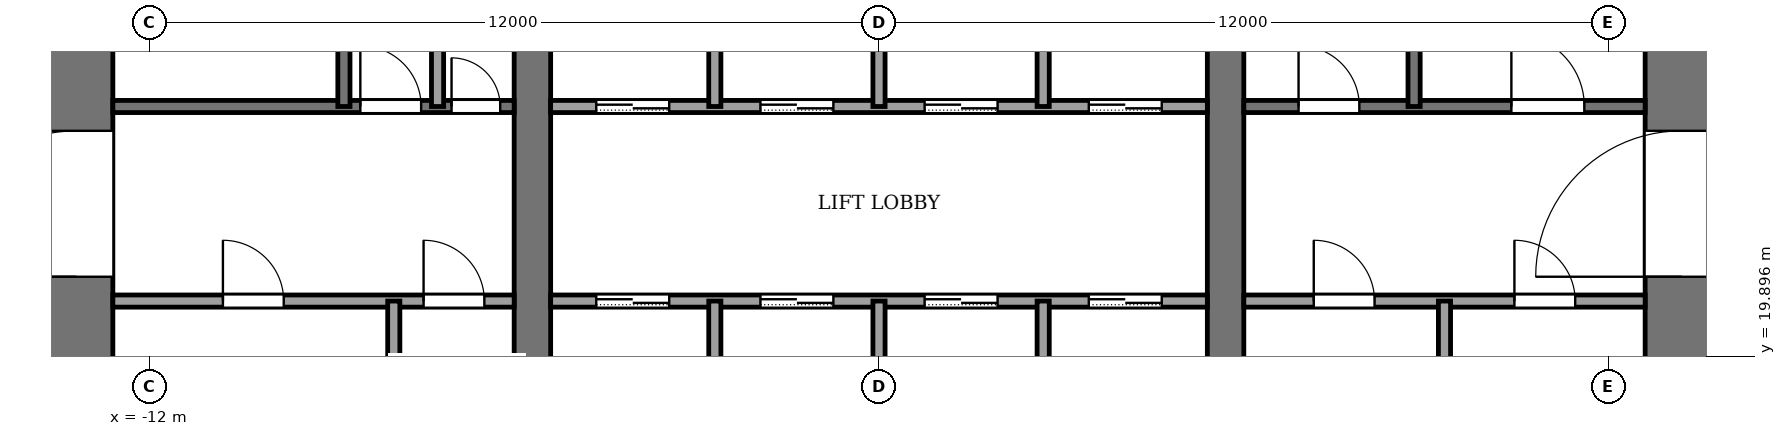
"""IFC4 building model, lengths in metres.
Left out: names, types, materials, properties, quantities, classifications, styles, units other than length and angle.
Written with IfcOpenShell. Run it as: python <this file> out.ifc"""

import sys

from ifc_helpers import new_model, si_unit, direction, frame, frame_2d, origin, place, context, subcontext, project, spatial, rectangle, extrude, element, fill, save


model = new_model("IFC4")
c1 = context("Model", 3, precision=1e-05, world=origin(), true_north=direction((0.0, 1.0)))
c2 = subcontext(c1, "Body", "Model", "MODEL_VIEW")
j1 = project(units=[si_unit("LENGTHUNIT", "METRE"), si_unit("PLANEANGLEUNIT", "RADIAN")], contexts=[c1])
p1 = place(None, origin())
s1 = spatial("IfcSite", under=j1, at=p1, CompositionType="ELEMENT")
p2 = place(p1, origin())
s2 = spatial("IfcBuilding", under=s1, at=p2, CompositionType="ELEMENT")
p3 = place(p2, frame((0.0, 0.0, 106.0)))
s3 = spatial("IfcBuildingStorey", under=s2, at=p3, CompositionType="ELEMENT", Elevation=106.0)
p4 = place(p3, frame((-13.2, 18.4, -0.13), z_axis=(0.0, 0.0, 1.0), x_axis=(0.0, 1.0, 0.0)))
e1 = element("IfcWall", 1, at=p4, inside=s3, PredefinedType="SHEAR", context=c2, shape_type="SweptSolid", body=[
    extrude(rectangle(XDim=19.2, YDim=1.2, at=frame_2d((9.6, 0.0))), origin(), (0.0, 0.0, 1.0), 4.0),
])
p5 = place(p4, frame((2.8, 0.0, 0.13)))
e2 = element("IfcOpeningElement", 2, at=p5, cuts=e1, PredefinedType="OPENING", context=c2, shape_type="SweptSolid", body=[
    extrude(rectangle(XDim=2.4, YDim=2.4, at=frame_2d((1.2, 1.2))), frame((0.0, 0.61, 0.0), z_axis=(0.0, -1.0, 0.0), x_axis=(1.0, 0.0, 0.0)), (0.0, 0.0, 1.0), 1.22),
])
p6 = place(p4, frame((13.4, 0.0, 0.13)))
e3 = element("IfcOpeningElement", 3, at=p6, cuts=e1, PredefinedType="OPENING", context=c2, shape_type="SweptSolid", body=[
    extrude(rectangle(XDim=1.4, YDim=2.2, at=frame_2d((0.7, 1.1))), frame((0.0, 0.61, 0.0), z_axis=(0.0, -1.0, 0.0), x_axis=(1.0, 0.0, 0.0)), (0.0, 0.0, 1.0), 1.22),
])
p7 = place(p3, frame((13.2, 18.4, -0.13), z_axis=(0.0, 0.0, 1.0), x_axis=(0.0, 1.0, 0.0)))
e4 = element("IfcWall", 4, at=p7, inside=s3, PredefinedType="SHEAR", context=c2, shape_type="SweptSolid", body=[
    extrude(rectangle(XDim=19.2, YDim=1.2, at=frame_2d((9.6, 0.0))), origin(), (0.0, 0.0, 1.0), 4.0),
])
p8 = place(p7, frame((2.8, 0.0, 0.13)))
e5 = element("IfcOpeningElement", 5, at=p8, cuts=e4, PredefinedType="OPENING", context=c2, shape_type="SweptSolid", body=[
    extrude(rectangle(XDim=2.4, YDim=2.4, at=frame_2d((1.2, 1.2))), frame((0.0, 0.61, 0.0), z_axis=(0.0, -1.0, 0.0), x_axis=(1.0, 0.0, 0.0)), (0.0, 0.0, 1.0), 1.22),
])
p9 = place(p7, frame((13.3, 0.0, 0.13)))
e6 = element("IfcOpeningElement", 6, at=p9, cuts=e4, PredefinedType="OPENING", context=c2, shape_type="SweptSolid", body=[
    extrude(rectangle(XDim=2.4, YDim=2.4, at=frame_2d((1.2, 1.2))), frame((0.0, 0.61, 0.0), z_axis=(0.0, -1.0, 0.0), x_axis=(1.0, 0.0, 0.0)), (0.0, 0.0, 1.0), 1.22),
])
p10 = place(p3, frame((-5.7, 18.4, -0.13), z_axis=(0.0, 0.0, 1.0), x_axis=(0.0, 1.0, 0.0)))
e7 = element("IfcWall", 7, at=p10, inside=s3, PredefinedType="SHEAR", context=c2, shape_type="SweptSolid", body=[
    extrude(rectangle(XDim=19.2, YDim=0.6, at=frame_2d((9.6, 0.0))), origin(), (0.0, 0.0, 1.0), 4.0),
])
p11 = place(p10, frame((8.35, 0.0, 0.13)))
e8 = element("IfcOpeningElement", 8, at=p11, cuts=e7, PredefinedType="OPENING", context=c2, shape_type="SweptSolid", body=[
    extrude(rectangle(XDim=0.9, YDim=2.1, at=frame_2d((0.45, 1.05))), frame((0.0, 0.31, 0.0), z_axis=(0.0, -1.0, 0.0), x_axis=(1.0, 0.0, 0.0)), (0.0, 0.0, 1.0), 0.62),
])
p12 = place(p3, frame((5.7, 18.4, -0.13), z_axis=(0.0, 0.0, 1.0), x_axis=(0.0, 1.0, 0.0)))
e9 = element("IfcWall", 9, at=p12, inside=s3, PredefinedType="SHEAR", context=c2, shape_type="SweptSolid", body=[
    extrude(rectangle(XDim=19.2, YDim=0.6, at=frame_2d((9.6, 0.0))), origin(), (0.0, 0.0, 1.0), 4.0),
])
p13 = place(p12, frame((8.35, 0.0, 0.13)))
e10 = element("IfcOpeningElement", 10, at=p13, cuts=e9, PredefinedType="OPENING", context=c2, shape_type="SweptSolid", body=[
    extrude(rectangle(XDim=0.9, YDim=2.1, at=frame_2d((0.45, 1.05))), frame((0.0, 0.31, 0.0), z_axis=(0.0, -1.0, 0.0), x_axis=(1.0, 0.0, 0.0)), (0.0, 0.0, 1.0), 0.62),
])
p14 = place(p12, frame((13.3, 0.0, 0.13)))
e11 = element("IfcOpeningElement", 11, at=p14, cuts=e9, PredefinedType="OPENING", context=c2, shape_type="SweptSolid", body=[
    extrude(rectangle(XDim=2.4, YDim=2.4, at=frame_2d((1.2, 1.2))), frame((0.0, 0.31, 0.0), z_axis=(0.0, -1.0, 0.0), x_axis=(1.0, 0.0, 0.0)), (0.0, 0.0, 1.0), 0.62),
])
p15 = place(p3, frame((-12.6, 20.8, 0.0), z_axis=(0.0, 0.0, 1.0), x_axis=(1.0, 0.0, 0.0)))
e12 = element("IfcWall", 12, at=p15, inside=s3, PredefinedType="PARTITIONING", context=c2, shape_type="SweptSolid", body=[
    extrude(rectangle(XDim=6.6, YDim=0.2, at=frame_2d((3.3, 0.0))), origin(), (0.0, 0.0, 1.0), 3.87),
])
p16 = place(p15, frame((1.81, 0.0, 0.0)))
e13 = element("IfcOpeningElement", 13, at=p16, cuts=e12, PredefinedType="OPENING", context=c2, shape_type="SweptSolid", body=[
    extrude(rectangle(XDim=1.0, YDim=2.1, at=frame_2d((0.5, 1.05))), frame((0.0, 0.11, 0.0), z_axis=(0.0, -1.0, 0.0), x_axis=(1.0, 0.0, 0.0)), (0.0, 0.0, 1.0), 0.22),
])
p17 = place(p15, frame((5.11, 0.0, 0.0)))
e14 = element("IfcOpeningElement", 14, at=p17, cuts=e12, PredefinedType="OPENING", context=c2, shape_type="SweptSolid", body=[
    extrude(rectangle(XDim=1.0, YDim=2.1, at=frame_2d((0.5, 1.05))), frame((0.0, 0.11, 0.0), z_axis=(0.0, -1.0, 0.0), x_axis=(1.0, 0.0, 0.0)), (0.0, 0.0, 1.0), 0.22),
])
p18 = place(p3, frame((-5.4, 20.8, 0.0), z_axis=(0.0, 0.0, 1.0), x_axis=(1.0, 0.0, 0.0)))
e15 = element("IfcWall", 15, at=p18, inside=s3, PredefinedType="PARTITIONING", context=c2, shape_type="SweptSolid", body=[
    extrude(rectangle(XDim=10.8, YDim=0.2, at=frame_2d((5.4, 0.0))), origin(), (0.0, 0.0, 1.0), 3.87),
])
p19 = place(p18, frame((0.75, 0.0, 0.0)))
e16 = element("IfcOpeningElement", 16, at=p19, cuts=e15, PredefinedType="OPENING", context=c2, shape_type="SweptSolid", body=[
    extrude(rectangle(XDim=1.2, YDim=2.2, at=frame_2d((0.6, 1.1))), frame((0.0, 0.11, 0.0), z_axis=(0.0, -1.0, 0.0), x_axis=(1.0, 0.0, 0.0)), (0.0, 0.0, 1.0), 0.22),
])
p20 = place(p18, frame((3.45, 0.0, 0.0)))
e17 = element("IfcOpeningElement", 17, at=p20, cuts=e15, PredefinedType="OPENING", context=c2, shape_type="SweptSolid", body=[
    extrude(rectangle(XDim=1.2, YDim=2.2, at=frame_2d((0.6, 1.1))), frame((0.0, 0.11, 0.0), z_axis=(0.0, -1.0, 0.0), x_axis=(1.0, 0.0, 0.0)), (0.0, 0.0, 1.0), 0.22),
])
p21 = place(p18, frame((6.15, 0.0, 0.0)))
e18 = element("IfcOpeningElement", 18, at=p21, cuts=e15, PredefinedType="OPENING", context=c2, shape_type="SweptSolid", body=[
    extrude(rectangle(XDim=1.2, YDim=2.2, at=frame_2d((0.6, 1.1))), frame((0.0, 0.11, 0.0), z_axis=(0.0, -1.0, 0.0), x_axis=(1.0, 0.0, 0.0)), (0.0, 0.0, 1.0), 0.22),
])
p22 = place(p18, frame((8.85, 0.0, 0.0)))
e19 = element("IfcOpeningElement", 19, at=p22, cuts=e15, PredefinedType="OPENING", context=c2, shape_type="SweptSolid", body=[
    extrude(rectangle(XDim=1.2, YDim=2.2, at=frame_2d((0.6, 1.1))), frame((0.0, 0.11, 0.0), z_axis=(0.0, -1.0, 0.0), x_axis=(1.0, 0.0, 0.0)), (0.0, 0.0, 1.0), 0.22),
])
p23 = place(p3, frame((6.0, 20.8, 0.0), z_axis=(0.0, 0.0, 1.0), x_axis=(1.0, 0.0, 0.0)))
e20 = element("IfcWall", 20, at=p23, inside=s3, PredefinedType="PARTITIONING", context=c2, shape_type="SweptSolid", body=[
    extrude(rectangle(XDim=6.6, YDim=0.2, at=frame_2d((3.3, 0.0))), origin(), (0.0, 0.0, 1.0), 3.87),
])
p24 = place(p23, frame((1.15, 0.0, 0.0)))
e21 = element("IfcOpeningElement", 21, at=p24, cuts=e20, PredefinedType="OPENING", context=c2, shape_type="SweptSolid", body=[
    extrude(rectangle(XDim=1.0, YDim=2.1, at=frame_2d((0.5, 1.05))), frame((0.0, 0.11, 0.0), z_axis=(0.0, -1.0, 0.0), x_axis=(1.0, 0.0, 0.0)), (0.0, 0.0, 1.0), 0.22),
])
p25 = place(p23, frame((4.45, 0.0, 0.0)))
e22 = element("IfcOpeningElement", 22, at=p25, cuts=e20, PredefinedType="OPENING", context=c2, shape_type="SweptSolid", body=[
    extrude(rectangle(XDim=1.0, YDim=2.1, at=frame_2d((0.5, 1.05))), frame((0.0, 0.11, 0.0), z_axis=(0.0, -1.0, 0.0), x_axis=(1.0, 0.0, 0.0)), (0.0, 0.0, 1.0), 0.22),
])
p26 = place(p3, frame((-12.6, 24.0, 0.0), z_axis=(0.0, 0.0, 1.0), x_axis=(1.0, 0.0, 0.0)))
e23 = element("IfcWall", 23, at=p26, inside=s3, PredefinedType="PARTITIONING", context=c2, shape_type="SweptSolid", body=[
    extrude(rectangle(XDim=6.6, YDim=0.2, at=frame_2d((3.3, 0.0))), origin(), (0.0, 0.0, 1.0), 3.87),
])
p27 = place(p26, frame((4.07, 0.0, 0.0)))
e24 = element("IfcOpeningElement", 24, at=p27, cuts=e23, PredefinedType="OPENING", context=c2, shape_type="SweptSolid", body=[
    extrude(rectangle(XDim=1.0, YDim=2.1, at=frame_2d((0.5, 1.05))), frame((0.0, 0.11, 0.0), z_axis=(0.0, -1.0, 0.0), x_axis=(1.0, 0.0, 0.0)), (0.0, 0.0, 1.0), 0.22),
])
p28 = place(p26, frame((5.57, 0.0, 0.0)))
e25 = element("IfcOpeningElement", 25, at=p28, cuts=e23, PredefinedType="OPENING", context=c2, shape_type="SweptSolid", body=[
    extrude(rectangle(XDim=0.8, YDim=2.1, at=frame_2d((0.4, 1.05))), frame((0.0, 0.11, 0.0), z_axis=(0.0, -1.0, 0.0), x_axis=(1.0, 0.0, 0.0)), (0.0, 0.0, 1.0), 0.22),
])
p29 = place(p3, frame((-5.4, 24.0, 0.0), z_axis=(0.0, 0.0, 1.0), x_axis=(1.0, 0.0, 0.0)))
e26 = element("IfcWall", 26, at=p29, inside=s3, PredefinedType="PARTITIONING", context=c2, shape_type="SweptSolid", body=[
    extrude(rectangle(XDim=10.8, YDim=0.2, at=frame_2d((5.4, 0.0))), origin(), (0.0, 0.0, 1.0), 3.87),
])
p30 = place(p29, frame((0.75, 0.0, 0.0)))
e27 = element("IfcOpeningElement", 27, at=p30, cuts=e26, PredefinedType="OPENING", context=c2, shape_type="SweptSolid", body=[
    extrude(rectangle(XDim=1.2, YDim=2.2, at=frame_2d((0.6, 1.1))), frame((0.0, 0.11, 0.0), z_axis=(0.0, -1.0, 0.0), x_axis=(1.0, 0.0, 0.0)), (0.0, 0.0, 1.0), 0.22),
])
p31 = place(p29, frame((3.45, 0.0, 0.0)))
e28 = element("IfcOpeningElement", 28, at=p31, cuts=e26, PredefinedType="OPENING", context=c2, shape_type="SweptSolid", body=[
    extrude(rectangle(XDim=1.2, YDim=2.2, at=frame_2d((0.6, 1.1))), frame((0.0, 0.11, 0.0), z_axis=(0.0, -1.0, 0.0), x_axis=(1.0, 0.0, 0.0)), (0.0, 0.0, 1.0), 0.22),
])
p32 = place(p29, frame((6.15, 0.0, 0.0)))
e29 = element("IfcOpeningElement", 29, at=p32, cuts=e26, PredefinedType="OPENING", context=c2, shape_type="SweptSolid", body=[
    extrude(rectangle(XDim=1.2, YDim=2.2, at=frame_2d((0.6, 1.1))), frame((0.0, 0.11, 0.0), z_axis=(0.0, -1.0, 0.0), x_axis=(1.0, 0.0, 0.0)), (0.0, 0.0, 1.0), 0.22),
])
p33 = place(p29, frame((8.85, 0.0, 0.0)))
e30 = element("IfcOpeningElement", 30, at=p33, cuts=e26, PredefinedType="OPENING", context=c2, shape_type="SweptSolid", body=[
    extrude(rectangle(XDim=1.2, YDim=2.2, at=frame_2d((0.6, 1.1))), frame((0.0, 0.11, 0.0), z_axis=(0.0, -1.0, 0.0), x_axis=(1.0, 0.0, 0.0)), (0.0, 0.0, 1.0), 0.22),
])
p34 = place(p3, frame((6.0, 24.0, 0.0), z_axis=(0.0, 0.0, 1.0), x_axis=(1.0, 0.0, 0.0)))
e31 = element("IfcWall", 31, at=p34, inside=s3, PredefinedType="PARTITIONING", context=c2, shape_type="SweptSolid", body=[
    extrude(rectangle(XDim=6.6, YDim=0.2, at=frame_2d((3.3, 0.0))), origin(), (0.0, 0.0, 1.0), 3.87),
])
p35 = place(p34, frame((0.9, 0.0, 0.0)))
e32 = element("IfcOpeningElement", 32, at=p35, cuts=e31, PredefinedType="OPENING", context=c2, shape_type="SweptSolid", body=[
    extrude(rectangle(XDim=1.0, YDim=2.1, at=frame_2d((0.5, 1.05))), frame((0.0, 0.11, 0.0), z_axis=(0.0, -1.0, 0.0), x_axis=(1.0, 0.0, 0.0)), (0.0, 0.0, 1.0), 0.22),
])
p36 = place(p34, frame((4.4, 0.0, 0.0)))
e33 = element("IfcOpeningElement", 33, at=p36, cuts=e31, PredefinedType="OPENING", context=c2, shape_type="SweptSolid", body=[
    extrude(rectangle(XDim=1.2, YDim=2.2, at=frame_2d((0.6, 1.1))), frame((0.0, 0.11, 0.0), z_axis=(0.0, -1.0, 0.0), x_axis=(1.0, 0.0, 0.0)), (0.0, 0.0, 1.0), 0.22),
])
p37 = place(p3, frame((-8.8, 24.0, 0.0), z_axis=(0.0, 0.0, 1.0), x_axis=(0.0, 1.0, 0.0)))
e34 = element("IfcWall", 34, at=p37, inside=s3, PredefinedType="PARTITIONING", context=c2, shape_type="SweptSolid", body=[
    extrude(rectangle(XDim=7.4, YDim=0.2, at=frame_2d((3.7, 0.0))), origin(), (0.0, 0.0, 1.0), 3.87),
])
p38 = place(p3, frame((-7.98, 18.4, 0.0), z_axis=(0.0, 0.0, 1.0), x_axis=(0.0, 1.0, 0.0)))
e35 = element("IfcWall", 35, at=p38, inside=s3, PredefinedType="PARTITIONING", context=c2, shape_type="SweptSolid", body=[
    extrude(rectangle(XDim=2.4, YDim=0.2, at=frame_2d((1.2, 0.0))), origin(), (0.0, 0.0, 1.0), 3.87),
])
p39 = place(p3, frame((-7.26, 24.0, 0.0), z_axis=(0.0, 0.0, 1.0), x_axis=(0.0, 1.0, 0.0)))
e36 = element("IfcWall", 36, at=p39, inside=s3, PredefinedType="PARTITIONING", context=c2, shape_type="SweptSolid", body=[
    extrude(rectangle(XDim=7.4, YDim=0.2, at=frame_2d((3.7, 0.0))), origin(), (0.0, 0.0, 1.0), 3.87),
])
p40 = place(p3, frame((-2.7, 18.4, 0.0), z_axis=(0.0, 0.0, 1.0), x_axis=(0.0, 1.0, 0.0)))
e37 = element("IfcWall", 37, at=p40, inside=s3, PredefinedType="PARTITIONING", context=c2, shape_type="SweptSolid", body=[
    extrude(rectangle(XDim=2.4, YDim=0.2, at=frame_2d((1.2, 0.0))), origin(), (0.0, 0.0, 1.0), 3.87),
])
p41 = place(p3, frame((-2.7, 24.0, 0.0), z_axis=(0.0, 0.0, 1.0), x_axis=(0.0, 1.0, 0.0)))
e38 = element("IfcWall", 38, at=p41, inside=s3, PredefinedType="PARTITIONING", context=c2, shape_type="SweptSolid", body=[
    extrude(rectangle(XDim=2.4, YDim=0.2, at=frame_2d((1.2, 0.0))), origin(), (0.0, 0.0, 1.0), 3.87),
])
p42 = place(p3, frame((0.0, 18.4, 0.0), z_axis=(0.0, 0.0, 1.0), x_axis=(0.0, 1.0, 0.0)))
e39 = element("IfcWall", 39, at=p42, inside=s3, PredefinedType="PARTITIONING", context=c2, shape_type="SweptSolid", body=[
    extrude(rectangle(XDim=2.4, YDim=0.2, at=frame_2d((1.2, 0.0))), origin(), (0.0, 0.0, 1.0), 3.87),
])
p43 = place(p3, frame((0.0, 24.0, 0.0), z_axis=(0.0, 0.0, 1.0), x_axis=(0.0, 1.0, 0.0)))
e40 = element("IfcWall", 40, at=p43, inside=s3, PredefinedType="PARTITIONING", context=c2, shape_type="SweptSolid", body=[
    extrude(rectangle(XDim=6.4, YDim=0.2, at=frame_2d((3.2, 0.0))), origin(), (0.0, 0.0, 1.0), 3.87),
])
p44 = place(p3, frame((2.7, 18.4, 0.0), z_axis=(0.0, 0.0, 1.0), x_axis=(0.0, 1.0, 0.0)))
e41 = element("IfcWall", 41, at=p44, inside=s3, PredefinedType="PARTITIONING", context=c2, shape_type="SweptSolid", body=[
    extrude(rectangle(XDim=2.4, YDim=0.2, at=frame_2d((1.2, 0.0))), origin(), (0.0, 0.0, 1.0), 3.87),
])
p45 = place(p3, frame((2.7, 24.0, 0.0), z_axis=(0.0, 0.0, 1.0), x_axis=(0.0, 1.0, 0.0)))
e42 = element("IfcWall", 42, at=p45, inside=s3, PredefinedType="PARTITIONING", context=c2, shape_type="SweptSolid", body=[
    extrude(rectangle(XDim=2.4, YDim=0.2, at=frame_2d((1.2, 0.0))), origin(), (0.0, 0.0, 1.0), 3.87),
])
p46 = place(p3, frame((8.8, 24.0, 0.0), z_axis=(0.0, 0.0, 1.0), x_axis=(0.0, 1.0, 0.0)))
e43 = element("IfcWall", 43, at=p46, inside=s3, PredefinedType="PARTITIONING", context=c2, shape_type="SweptSolid", body=[
    extrude(rectangle(XDim=7.4, YDim=0.2, at=frame_2d((3.7, 0.0))), origin(), (0.0, 0.0, 1.0), 3.87),
])
p47 = place(p3, frame((9.3, 18.4, 0.0), z_axis=(0.0, 0.0, 1.0), x_axis=(0.0, 1.0, 0.0)))
e44 = element("IfcWall", 44, at=p47, inside=s3, PredefinedType="PARTITIONING", context=c2, shape_type="SweptSolid", body=[
    extrude(rectangle(XDim=2.4, YDim=0.2, at=frame_2d((1.2, 0.0))), origin(), (0.0, 0.0, 1.0), 3.87),
])
p48 = place(p19, origin())
e45 = element("IfcDoor", 45, at=p48, inside=s3, OperationType="SLIDING_TO_LEFT", PredefinedType="DOOR", context=c2, shape_type="SweptSolid", body=[
    extrude(rectangle(XDim=1.2, YDim=2.2, at=frame_2d((0.6, 1.1))), frame((0.0, 0.025, 0.0), z_axis=(0.0, -1.0, 0.0), x_axis=(1.0, 0.0, 0.0)), (0.0, 0.0, 1.0), 0.05),
])
fill(e16, e45)
p49 = place(p20, origin())
e46 = element("IfcDoor", 46, at=p49, inside=s3, OperationType="SLIDING_TO_LEFT", PredefinedType="DOOR", context=c2, shape_type="SweptSolid", body=[
    extrude(rectangle(XDim=1.2, YDim=2.2, at=frame_2d((0.6, 1.1))), frame((0.0, 0.025, 0.0), z_axis=(0.0, -1.0, 0.0), x_axis=(1.0, 0.0, 0.0)), (0.0, 0.0, 1.0), 0.05),
])
fill(e17, e46)
p50 = place(p21, origin())
e47 = element("IfcDoor", 47, at=p50, inside=s3, OperationType="SLIDING_TO_LEFT", PredefinedType="DOOR", context=c2, shape_type="SweptSolid", body=[
    extrude(rectangle(XDim=1.2, YDim=2.2, at=frame_2d((0.6, 1.1))), frame((0.0, 0.025, 0.0), z_axis=(0.0, -1.0, 0.0), x_axis=(1.0, 0.0, 0.0)), (0.0, 0.0, 1.0), 0.05),
])
fill(e18, e47)
p51 = place(p22, origin())
e48 = element("IfcDoor", 48, at=p51, inside=s3, OperationType="SLIDING_TO_LEFT", PredefinedType="DOOR", context=c2, shape_type="SweptSolid", body=[
    extrude(rectangle(XDim=1.2, YDim=2.2, at=frame_2d((0.6, 1.1))), frame((0.0, 0.025, 0.0), z_axis=(0.0, -1.0, 0.0), x_axis=(1.0, 0.0, 0.0)), (0.0, 0.0, 1.0), 0.05),
])
fill(e19, e48)
p52 = place(p30, origin())
e49 = element("IfcDoor", 49, at=p52, inside=s3, OperationType="SLIDING_TO_LEFT", PredefinedType="DOOR", context=c2, shape_type="SweptSolid", body=[
    extrude(rectangle(XDim=1.2, YDim=2.2, at=frame_2d((0.6, 1.1))), frame((0.0, 0.025, 0.0), z_axis=(0.0, -1.0, 0.0), x_axis=(1.0, 0.0, 0.0)), (0.0, 0.0, 1.0), 0.05),
])
fill(e27, e49)
p53 = place(p31, origin())
e50 = element("IfcDoor", 50, at=p53, inside=s3, OperationType="SLIDING_TO_LEFT", PredefinedType="DOOR", context=c2, shape_type="SweptSolid", body=[
    extrude(rectangle(XDim=1.2, YDim=2.2, at=frame_2d((0.6, 1.1))), frame((0.0, 0.025, 0.0), z_axis=(0.0, -1.0, 0.0), x_axis=(1.0, 0.0, 0.0)), (0.0, 0.0, 1.0), 0.05),
])
fill(e28, e50)
p54 = place(p32, origin())
e51 = element("IfcDoor", 51, at=p54, inside=s3, OperationType="SLIDING_TO_LEFT", PredefinedType="DOOR", context=c2, shape_type="SweptSolid", body=[
    extrude(rectangle(XDim=1.2, YDim=2.2, at=frame_2d((0.6, 1.1))), frame((0.0, 0.025, 0.0), z_axis=(0.0, -1.0, 0.0), x_axis=(1.0, 0.0, 0.0)), (0.0, 0.0, 1.0), 0.05),
])
fill(e29, e51)
p55 = place(p33, origin())
e52 = element("IfcDoor", 52, at=p55, inside=s3, OperationType="SLIDING_TO_LEFT", PredefinedType="DOOR", context=c2, shape_type="SweptSolid", body=[
    extrude(rectangle(XDim=1.2, YDim=2.2, at=frame_2d((0.6, 1.1))), frame((0.0, 0.025, 0.0), z_axis=(0.0, -1.0, 0.0), x_axis=(1.0, 0.0, 0.0)), (0.0, 0.0, 1.0), 0.05),
])
fill(e30, e52)
p56 = place(p16, origin())
e53 = element("IfcDoor", 53, at=p56, inside=s3, OperationType="SINGLE_SWING_LEFT", PredefinedType="DOOR", context=c2, shape_type="SweptSolid", body=[
    extrude(rectangle(XDim=1.0, YDim=2.1, at=frame_2d((0.5, 1.05))), frame((0.0, 0.025, 0.0), z_axis=(0.0, -1.0, 0.0), x_axis=(1.0, 0.0, 0.0)), (0.0, 0.0, 1.0), 0.05),
])
fill(e13, e53)
p57 = place(p17, origin())
e54 = element("IfcDoor", 54, at=p57, inside=s3, OperationType="SINGLE_SWING_LEFT", PredefinedType="DOOR", context=c2, shape_type="SweptSolid", body=[
    extrude(rectangle(XDim=1.0, YDim=2.1, at=frame_2d((0.5, 1.05))), frame((0.0, 0.025, 0.0), z_axis=(0.0, -1.0, 0.0), x_axis=(1.0, 0.0, 0.0)), (0.0, 0.0, 1.0), 0.05),
])
fill(e14, e54)
p58 = place(p24, origin())
e55 = element("IfcDoor", 55, at=p58, inside=s3, OperationType="SINGLE_SWING_LEFT", PredefinedType="DOOR", context=c2, shape_type="SweptSolid", body=[
    extrude(rectangle(XDim=1.0, YDim=2.1, at=frame_2d((0.5, 1.05))), frame((0.0, 0.025, 0.0), z_axis=(0.0, -1.0, 0.0), x_axis=(1.0, 0.0, 0.0)), (0.0, 0.0, 1.0), 0.05),
])
fill(e21, e55)
p59 = place(p25, origin())
e56 = element("IfcDoor", 56, at=p59, inside=s3, OperationType="SINGLE_SWING_LEFT", PredefinedType="DOOR", context=c2, shape_type="SweptSolid", body=[
    extrude(rectangle(XDim=1.0, YDim=2.1, at=frame_2d((0.5, 1.05))), frame((0.0, 0.025, 0.0), z_axis=(0.0, -1.0, 0.0), x_axis=(1.0, 0.0, 0.0)), (0.0, 0.0, 1.0), 0.05),
])
fill(e22, e56)
p60 = place(p27, origin())
e57 = element("IfcDoor", 57, at=p60, inside=s3, OperationType="SINGLE_SWING_RIGHT", PredefinedType="DOOR", context=c2, shape_type="SweptSolid", body=[
    extrude(rectangle(XDim=1.0, YDim=2.1, at=frame_2d((0.5, 1.05))), frame((0.0, 0.025, 0.0), z_axis=(0.0, -1.0, 0.0), x_axis=(1.0, 0.0, 0.0)), (0.0, 0.0, 1.0), 0.05),
])
fill(e24, e57)
p61 = place(p28, origin())
e58 = element("IfcDoor", 58, at=p61, inside=s3, OperationType="SINGLE_SWING_LEFT", PredefinedType="DOOR", context=c2, shape_type="SweptSolid", body=[
    extrude(rectangle(XDim=0.8, YDim=2.1, at=frame_2d((0.4, 1.05))), frame((0.0, 0.025, 0.0), z_axis=(0.0, -1.0, 0.0), x_axis=(1.0, 0.0, 0.0)), (0.0, 0.0, 1.0), 0.05),
])
fill(e25, e58)
p62 = place(p35, origin())
e59 = element("IfcDoor", 59, at=p62, inside=s3, OperationType="SINGLE_SWING_RIGHT", PredefinedType="DOOR", context=c2, shape_type="SweptSolid", body=[
    extrude(rectangle(XDim=1.0, YDim=2.1, at=frame_2d((0.5, 1.05))), frame((0.0, 0.025, 0.0), z_axis=(0.0, -1.0, 0.0), x_axis=(1.0, 0.0, 0.0)), (0.0, 0.0, 1.0), 0.05),
])
fill(e32, e59)
p63 = place(p36, origin())
e60 = element("IfcDoor", 60, at=p63, inside=s3, OperationType="SINGLE_SWING_LEFT", PredefinedType="DOOR", context=c2, shape_type="SweptSolid", body=[
    extrude(rectangle(XDim=1.2, YDim=2.2, at=frame_2d((0.6, 1.1))), frame((0.0, 0.025, 0.0), z_axis=(0.0, -1.0, 0.0), x_axis=(1.0, 0.0, 0.0)), (0.0, 0.0, 1.0), 0.05),
])
fill(e33, e60)
p64 = place(p5, origin())
e61 = element("IfcDoor", 61, at=p64, inside=s3, OperationType="DOUBLE_DOOR_SINGLE_SWING", PredefinedType="DOOR", context=c2, shape_type="SweptSolid", body=[
    extrude(rectangle(XDim=2.4, YDim=2.4, at=frame_2d((1.2, 1.2))), frame((0.0, 0.025, 0.0), z_axis=(0.0, -1.0, 0.0), x_axis=(1.0, 0.0, 0.0)), (0.0, 0.0, 1.0), 0.05),
])
fill(e2, e61)
p65 = place(p8, origin())
e62 = element("IfcDoor", 62, at=p65, inside=s3, OperationType="DOUBLE_DOOR_SINGLE_SWING", PredefinedType="DOOR", context=c2, shape_type="SweptSolid", body=[
    extrude(rectangle(XDim=2.4, YDim=2.4, at=frame_2d((1.2, 1.2))), frame((0.0, 0.025, 0.0), z_axis=(0.0, -1.0, 0.0), x_axis=(1.0, 0.0, 0.0)), (0.0, 0.0, 1.0), 0.05),
])
fill(e5, e62)
save(model, sys.argv[1])
